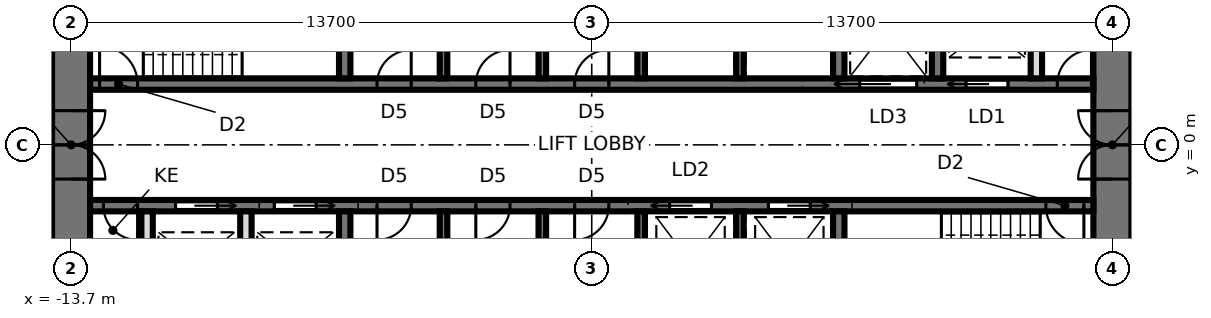
"""IFC4 building model, lengths in metres.
Left out: names, types, materials, properties, quantities, classifications, styles, units other than length and angle.
Written with IfcOpenShell. Run it as: python <this file> out.ifc"""

import sys

from ifc_helpers import new_model, si_unit, direction, frame, frame_2d, origin, place, context, subcontext, project, spatial, rectangle, extrude, element, fill, save


model = new_model("IFC4")
c1 = context("Model", 3, precision=1e-05, world=origin(), true_north=direction((0.0, 1.0)))
c2 = subcontext(c1, "Body", "Model", "MODEL_VIEW")
j1 = project(units=[si_unit("LENGTHUNIT", "METRE"), si_unit("PLANEANGLEUNIT", "RADIAN")], contexts=[c1])
p1 = place(None, origin())
s1 = spatial("IfcSite", under=j1, at=p1, CompositionType="ELEMENT")
p2 = place(p1, origin())
s2 = spatial("IfcBuilding", under=s1, at=p2, CompositionType="ELEMENT")
p3 = place(p2, frame((0.0, 0.0, 176.0)))
s3 = spatial("IfcBuildingStorey", under=s2, at=p3, CompositionType="ELEMENT", Elevation=176.0)
p4 = place(p3, frame((13.7, -9.5, 0.0), z_axis=(0.0, 0.0, 1.0), x_axis=(0.0, 1.0, 0.0)))
e1 = element("IfcWall", 1, at=p4, inside=s3, PredefinedType="SHEAR", context=c2, shape_type="SweptSolid", body=[
    extrude(rectangle(XDim=19.0, YDim=1.0, at=frame_2d((9.5, 0.0))), origin(), (0.0, 0.0, 1.0), 3.9),
])
p5 = place(p4, frame((8.6, 0.0, 0.0)))
e2 = element("IfcOpeningElement", 2, at=p5, cuts=e1, PredefinedType="OPENING", context=c2, shape_type="SweptSolid", body=[
    extrude(rectangle(XDim=1.8, YDim=2.4, at=frame_2d((0.9, 1.2))), frame((0.0, 0.51, 0.0), z_axis=(0.0, -1.0, 0.0), x_axis=(1.0, 0.0, 0.0)), (0.0, 0.0, 1.0), 1.02),
])
p6 = place(p3, frame((-13.7, 9.5, 0.0), z_axis=(0.0, 0.0, 1.0), x_axis=(0.0, -1.0, 0.0)))
e3 = element("IfcWall", 3, at=p6, inside=s3, PredefinedType="SHEAR", context=c2, shape_type="SweptSolid", body=[
    extrude(rectangle(XDim=19.0, YDim=1.0, at=frame_2d((9.5, 0.0))), origin(), (0.0, 0.0, 1.0), 3.9),
])
p7 = place(p6, frame((8.6, 0.0, 0.0)))
e4 = element("IfcOpeningElement", 4, at=p7, cuts=e3, PredefinedType="OPENING", context=c2, shape_type="SweptSolid", body=[
    extrude(rectangle(XDim=1.8, YDim=2.4, at=frame_2d((0.9, 1.2))), frame((0.0, 0.51, 0.0), z_axis=(0.0, -1.0, 0.0), x_axis=(1.0, 0.0, 0.0)), (0.0, 0.0, 1.0), 1.02),
])
p8 = place(p3, frame((-13.2, 1.6, 0.0), z_axis=(0.0, 0.0, 1.0), x_axis=(1.0, 0.0, 0.0)))
e5 = element("IfcWall", 5, at=p8, inside=s3, PredefinedType="SHEAR", context=c2, shape_type="SweptSolid", body=[
    extrude(rectangle(XDim=26.4, YDim=0.3, at=frame_2d((13.2, 0.0))), origin(), (0.0, 0.0, 1.0), 3.9),
])
p9 = place(p8, frame((0.25, 0.0, 0.0)))
e6 = element("IfcOpeningElement", 6, at=p9, cuts=e5, PredefinedType="OPENING", context=c2, shape_type="SweptSolid", body=[
    extrude(rectangle(XDim=1.0, YDim=2.1, at=frame_2d((0.5, 1.05))), frame((0.0, 0.16, 0.0), z_axis=(0.0, -1.0, 0.0), x_axis=(1.0, 0.0, 0.0)), (0.0, 0.0, 1.0), 0.32),
])
p10 = place(p8, frame((23.05, 0.0, 0.0)))
e7 = element("IfcOpeningElement", 7, at=p10, cuts=e5, PredefinedType="OPENING", context=c2, shape_type="SweptSolid", body=[
    extrude(rectangle(XDim=1.1, YDim=2.3, at=frame_2d((0.55, 1.15))), frame((0.0, 0.16, 0.0), z_axis=(0.0, -1.0, 0.0), x_axis=(1.0, 0.0, 0.0)), (0.0, 0.0, 1.0), 0.32),
])
p11 = place(p8, frame((20.25, 0.0, 0.0)))
e8 = element("IfcOpeningElement", 8, at=p11, cuts=e5, PredefinedType="OPENING", context=c2, shape_type="SweptSolid", body=[
    extrude(rectangle(XDim=1.5, YDim=2.4, at=frame_2d((0.75, 1.2))), frame((0.0, 0.16, 0.0), z_axis=(0.0, -1.0, 0.0), x_axis=(1.0, 0.0, 0.0)), (0.0, 0.0, 1.0), 0.32),
])
p12 = place(p8, frame((7.55, 0.0, 0.0)))
e9 = element("IfcOpeningElement", 9, at=p12, cuts=e5, PredefinedType="OPENING", context=c2, shape_type="SweptSolid", body=[
    extrude(rectangle(XDim=0.9, YDim=2.1, at=frame_2d((0.45, 1.05))), frame((0.0, 0.16, 0.0), z_axis=(0.0, -1.0, 0.0), x_axis=(1.0, 0.0, 0.0)), (0.0, 0.0, 1.0), 0.32),
])
p13 = place(p8, frame((10.15, 0.0, 0.0)))
e10 = element("IfcOpeningElement", 10, at=p13, cuts=e5, PredefinedType="OPENING", context=c2, shape_type="SweptSolid", body=[
    extrude(rectangle(XDim=0.9, YDim=2.1, at=frame_2d((0.45, 1.05))), frame((0.0, 0.16, 0.0), z_axis=(0.0, -1.0, 0.0), x_axis=(1.0, 0.0, 0.0)), (0.0, 0.0, 1.0), 0.32),
])
p14 = place(p8, frame((12.75, 0.0, 0.0)))
e11 = element("IfcOpeningElement", 11, at=p14, cuts=e5, PredefinedType="OPENING", context=c2, shape_type="SweptSolid", body=[
    extrude(rectangle(XDim=0.9, YDim=2.1, at=frame_2d((0.45, 1.05))), frame((0.0, 0.16, 0.0), z_axis=(0.0, -1.0, 0.0), x_axis=(1.0, 0.0, 0.0)), (0.0, 0.0, 1.0), 0.32),
])
p15 = place(p8, frame((25.45, 0.0, 0.0)))
e12 = element("IfcOpeningElement", 12, at=p15, cuts=e5, PredefinedType="OPENING", context=c2, shape_type="SweptSolid", body=[
    extrude(rectangle(XDim=0.9, YDim=2.1, at=frame_2d((0.45, 1.05))), frame((0.0, 0.16, 0.0), z_axis=(0.0, -1.0, 0.0), x_axis=(1.0, 0.0, 0.0)), (0.0, 0.0, 1.0), 0.32),
])
p16 = place(p3, frame((-13.2, -1.6, 0.0), z_axis=(0.0, 0.0, 1.0), x_axis=(1.0, 0.0, 0.0)))
e13 = element("IfcWall", 13, at=p16, inside=s3, PredefinedType="SHEAR", context=c2, shape_type="SweptSolid", body=[
    extrude(rectangle(XDim=26.4, YDim=0.3, at=frame_2d((13.2, 0.0))), origin(), (0.0, 0.0, 1.0), 3.9),
])
p17 = place(p16, frame((25.15, 0.0, 0.0)))
e14 = element("IfcOpeningElement", 14, at=p17, cuts=e13, PredefinedType="OPENING", context=c2, shape_type="SweptSolid", body=[
    extrude(rectangle(XDim=1.0, YDim=2.1, at=frame_2d((0.5, 1.05))), frame((0.0, 0.16, 0.0), z_axis=(0.0, -1.0, 0.0), x_axis=(1.0, 0.0, 0.0)), (0.0, 0.0, 1.0), 0.32),
])
p18 = place(p16, frame((7.55, 0.0, 0.0)))
e15 = element("IfcOpeningElement", 15, at=p18, cuts=e13, PredefinedType="OPENING", context=c2, shape_type="SweptSolid", body=[
    extrude(rectangle(XDim=0.9, YDim=2.1, at=frame_2d((0.45, 1.05))), frame((0.0, 0.16, 0.0), z_axis=(0.0, -1.0, 0.0), x_axis=(1.0, 0.0, 0.0)), (0.0, 0.0, 1.0), 0.32),
])
p19 = place(p16, frame((10.15, 0.0, 0.0)))
e16 = element("IfcOpeningElement", 16, at=p19, cuts=e13, PredefinedType="OPENING", context=c2, shape_type="SweptSolid", body=[
    extrude(rectangle(XDim=0.9, YDim=2.1, at=frame_2d((0.45, 1.05))), frame((0.0, 0.16, 0.0), z_axis=(0.0, -1.0, 0.0), x_axis=(1.0, 0.0, 0.0)), (0.0, 0.0, 1.0), 0.32),
])
p20 = place(p16, frame((12.75, 0.0, 0.0)))
e17 = element("IfcOpeningElement", 17, at=p20, cuts=e13, PredefinedType="OPENING", context=c2, shape_type="SweptSolid", body=[
    extrude(rectangle(XDim=0.9, YDim=2.1, at=frame_2d((0.45, 1.05))), frame((0.0, 0.16, 0.0), z_axis=(0.0, -1.0, 0.0), x_axis=(1.0, 0.0, 0.0)), (0.0, 0.0, 1.0), 0.32),
])
p21 = place(p16, frame((15.25, 0.0, 0.0)))
e18 = element("IfcOpeningElement", 18, at=p21, cuts=e13, PredefinedType="OPENING", context=c2, shape_type="SweptSolid", body=[
    extrude(rectangle(XDim=1.1, YDim=2.3, at=frame_2d((0.55, 1.15))), frame((0.0, 0.16, 0.0), z_axis=(0.0, -1.0, 0.0), x_axis=(1.0, 0.0, 0.0)), (0.0, 0.0, 1.0), 0.32),
])
p22 = place(p16, frame((17.85, 0.0, 0.0)))
e19 = element("IfcOpeningElement", 19, at=p22, cuts=e13, PredefinedType="OPENING", context=c2, shape_type="SweptSolid", body=[
    extrude(rectangle(XDim=1.1, YDim=2.3, at=frame_2d((0.55, 1.15))), frame((0.0, 0.16, 0.0), z_axis=(0.0, -1.0, 0.0), x_axis=(1.0, 0.0, 0.0)), (0.0, 0.0, 1.0), 0.32),
])
p23 = place(p16, frame((4.85, 0.0, 0.0)))
e20 = element("IfcOpeningElement", 20, at=p23, cuts=e13, PredefinedType="OPENING", context=c2, shape_type="SweptSolid", body=[
    extrude(rectangle(XDim=1.1, YDim=2.3, at=frame_2d((0.55, 1.15))), frame((0.0, 0.16, 0.0), z_axis=(0.0, -1.0, 0.0), x_axis=(1.0, 0.0, 0.0)), (0.0, 0.0, 1.0), 0.32),
])
p24 = place(p16, frame((2.25, 0.0, 0.0)))
e21 = element("IfcOpeningElement", 21, at=p24, cuts=e13, PredefinedType="OPENING", context=c2, shape_type="SweptSolid", body=[
    extrude(rectangle(XDim=1.1, YDim=2.3, at=frame_2d((0.55, 1.15))), frame((0.0, 0.16, 0.0), z_axis=(0.0, -1.0, 0.0), x_axis=(1.0, 0.0, 0.0)), (0.0, 0.0, 1.0), 0.32),
])
p25 = place(p16, frame((0.35, 0.0, 0.0)))
e22 = element("IfcOpeningElement", 22, at=p25, cuts=e13, PredefinedType="OPENING", context=c2, shape_type="SweptSolid", body=[
    extrude(rectangle(XDim=0.9, YDim=2.1, at=frame_2d((0.45, 1.05))), frame((0.0, 0.16, 0.0), z_axis=(0.0, -1.0, 0.0), x_axis=(1.0, 0.0, 0.0)), (0.0, 0.0, 1.0), 0.32),
])
for number, where, z_axis, x_axis in (
    (23, (-6.5, 1.75, 0.0), (0.0, 0.0, 1.0), (0.0, 1.0, 0.0)),
    (24, (6.5, 1.75, 0.0), (0.0, 0.0, 1.0), (0.0, 1.0, 0.0)),
):
    element("IfcWall", number, at=place(p3, frame(where, z_axis=z_axis, x_axis=x_axis)), inside=s3, PredefinedType="SHEAR", context=c2, shape_type="SweptSolid", body=[
        extrude(rectangle(XDim=2.7, YDim=0.3, at=frame_2d((1.35, 0.0))), origin(), (0.0, 0.0, 1.0), 3.9),
    ])
for number, where, z_axis, x_axis in (
    (25, (-3.9, 1.75, 0.0), (0.0, 0.0, 1.0), (0.0, 1.0, 0.0)),
    (26, (-1.3, 1.75, 0.0), (0.0, 0.0, 1.0), (0.0, 1.0, 0.0)),
    (27, (1.3, 1.75, 0.0), (0.0, 0.0, 1.0), (0.0, 1.0, 0.0)),
    (28, (3.9, 1.75, 0.0), (0.0, 0.0, 1.0), (0.0, 1.0, 0.0)),
):
    element("IfcWall", number, at=place(p3, frame(where, z_axis=z_axis, x_axis=x_axis)), inside=s3, PredefinedType="SHEAR", context=c2, shape_type="SweptSolid", body=[
        extrude(rectangle(XDim=2.7, YDim=0.2, at=frame_2d((1.35, 0.0))), origin(), (0.0, 0.0, 1.0), 3.9),
    ])
for number, where, z_axis, x_axis in (
    (29, (-6.5, -1.75, 0.0), (0.0, 0.0, 1.0), (0.0, -1.0, 0.0)),
    (30, (6.5, -1.75, 0.0), (0.0, 0.0, 1.0), (0.0, -1.0, 0.0)),
):
    element("IfcWall", number, at=place(p3, frame(where, z_axis=z_axis, x_axis=x_axis)), inside=s3, PredefinedType="SHEAR", context=c2, shape_type="SweptSolid", body=[
        extrude(rectangle(XDim=2.7, YDim=0.3, at=frame_2d((1.35, 0.0))), origin(), (0.0, 0.0, 1.0), 3.9),
    ])
for number, where, z_axis, x_axis in (
    (31, (-3.9, -1.75, 0.0), (0.0, 0.0, 1.0), (0.0, -1.0, 0.0)),
    (32, (-1.3, -1.75, 0.0), (0.0, 0.0, 1.0), (0.0, -1.0, 0.0)),
    (33, (1.3, -1.75, 0.0), (0.0, 0.0, 1.0), (0.0, -1.0, 0.0)),
    (34, (3.9, -1.75, 0.0), (0.0, 0.0, 1.0), (0.0, -1.0, 0.0)),
):
    element("IfcWall", number, at=place(p3, frame(where, z_axis=z_axis, x_axis=x_axis)), inside=s3, PredefinedType="SHEAR", context=c2, shape_type="SweptSolid", body=[
        extrude(rectangle(XDim=2.7, YDim=0.2, at=frame_2d((1.35, 0.0))), origin(), (0.0, 0.0, 1.0), 3.9),
    ])
p26 = place(p3, frame((9.1, 1.75, 0.0), z_axis=(0.0, 0.0, 1.0), x_axis=(0.0, 1.0, 0.0)))
e35 = element("IfcWall", 35, at=p26, inside=s3, PredefinedType="SHEAR", context=c2, shape_type="SweptSolid", body=[
    extrude(rectangle(XDim=2.7, YDim=0.3, at=frame_2d((1.35, 0.0))), origin(), (0.0, 0.0, 1.0), 3.9),
])
for number, where, z_axis, x_axis in (
    (36, (-9.1, -1.75, 0.0), (0.0, 0.0, 1.0), (0.0, -1.0, 0.0)),
    (37, (-11.7, -1.75, 0.0), (0.0, 0.0, 1.0), (0.0, -1.0, 0.0)),
    (38, (11.7, 1.75, 0.0), (0.0, 0.0, 1.0), (0.0, 1.0, 0.0)),
):
    element("IfcWall", number, at=place(p3, frame(where, z_axis=z_axis, x_axis=x_axis)), inside=s3, PredefinedType="SOLIDWALL", context=c2, shape_type="SweptSolid", body=[
        extrude(rectangle(XDim=2.7, YDim=0.3, at=frame_2d((1.35, 0.0))), origin(), (0.0, 0.0, 1.0), 3.74),
    ])
p27 = place(p7, origin())
e39 = element("IfcDoor", 39, at=p27, inside=s3, OperationType="DOUBLE_DOOR_SINGLE_SWING", PredefinedType="DOOR", context=c2, shape_type="SweptSolid", body=[
    extrude(rectangle(XDim=1.72, YDim=2.36, at=frame_2d((0.9, 1.18))), frame((0.0, 0.025, 0.0), z_axis=(0.0, -1.0, 0.0), x_axis=(1.0, 0.0, 0.0)), (0.0, 0.0, 1.0), 0.05),
    extrude(rectangle(XDim=0.04, YDim=2.4, at=frame_2d((0.02, 1.2))), frame((0.0, 0.25, 0.0), z_axis=(0.0, -1.0, 0.0), x_axis=(1.0, 0.0, 0.0)), (0.0, 0.0, 1.0), 0.5),
    extrude(rectangle(XDim=0.04, YDim=2.4, at=frame_2d((1.78, 1.2))), frame((0.0, 0.25, 0.0), z_axis=(0.0, -1.0, 0.0), x_axis=(1.0, 0.0, 0.0)), (0.0, 0.0, 1.0), 0.5),
    extrude(rectangle(XDim=1.72, YDim=0.04, at=frame_2d((0.9, 2.38))), frame((0.0, 0.25, 0.0), z_axis=(0.0, -1.0, 0.0), x_axis=(1.0, 0.0, 0.0)), (0.0, 0.0, 1.0), 0.5),
])
fill(e4, e39)
p28 = place(p5, origin())
e40 = element("IfcDoor", 40, at=p28, inside=s3, OperationType="DOUBLE_DOOR_SINGLE_SWING", PredefinedType="DOOR", context=c2, shape_type="SweptSolid", body=[
    extrude(rectangle(XDim=1.72, YDim=2.36, at=frame_2d((0.9, 1.18))), frame((0.0, 0.025, 0.0), z_axis=(0.0, -1.0, 0.0), x_axis=(1.0, 0.0, 0.0)), (0.0, 0.0, 1.0), 0.05),
    extrude(rectangle(XDim=0.04, YDim=2.4, at=frame_2d((0.02, 1.2))), frame((0.0, 0.25, 0.0), z_axis=(0.0, -1.0, 0.0), x_axis=(1.0, 0.0, 0.0)), (0.0, 0.0, 1.0), 0.5),
    extrude(rectangle(XDim=0.04, YDim=2.4, at=frame_2d((1.78, 1.2))), frame((0.0, 0.25, 0.0), z_axis=(0.0, -1.0, 0.0), x_axis=(1.0, 0.0, 0.0)), (0.0, 0.0, 1.0), 0.5),
    extrude(rectangle(XDim=1.72, YDim=0.04, at=frame_2d((0.9, 2.38))), frame((0.0, 0.25, 0.0), z_axis=(0.0, -1.0, 0.0), x_axis=(1.0, 0.0, 0.0)), (0.0, 0.0, 1.0), 0.5),
])
fill(e2, e40)
p29 = place(p9, origin())
e41 = element("IfcDoor", 41, at=p29, inside=s3, OperationType="SINGLE_SWING_LEFT", PredefinedType="DOOR", context=c2, shape_type="SweptSolid", body=[
    extrude(rectangle(XDim=1.0, YDim=2.1, at=frame_2d((0.5, 1.05))), frame((0.0, 0.025, 0.0), z_axis=(0.0, -1.0, 0.0), x_axis=(1.0, 0.0, 0.0)), (0.0, 0.0, 1.0), 0.05),
])
fill(e6, e41)
p30 = place(p17, frame((1.0, 0.0, 0.0), z_axis=(0.0, 0.0, 1.0), x_axis=(-1.0, 0.0, 0.0)))
e42 = element("IfcDoor", 42, at=p30, inside=s3, OperationType="SINGLE_SWING_LEFT", PredefinedType="DOOR", context=c2, shape_type="SweptSolid", body=[
    extrude(rectangle(XDim=1.0, YDim=2.1, at=frame_2d((0.5, 1.05))), frame((0.0, 0.025, 0.0), z_axis=(0.0, -1.0, 0.0), x_axis=(1.0, 0.0, 0.0)), (0.0, 0.0, 1.0), 0.05),
])
fill(e14, e42)
p31 = place(p10, origin())
e43 = element("IfcDoor", 43, at=p31, inside=s3, OperationType="SLIDING_TO_LEFT", PredefinedType="DOOR", context=c2, shape_type="SweptSolid", body=[
    extrude(rectangle(XDim=1.1, YDim=2.3, at=frame_2d((0.55, 1.15))), frame((0.0, 0.025, 0.0), z_axis=(0.0, -1.0, 0.0), x_axis=(1.0, 0.0, 0.0)), (0.0, 0.0, 1.0), 0.05),
])
fill(e7, e43)
p32 = place(p11, origin())
e44 = element("IfcDoor", 44, at=p32, inside=s3, OperationType="SLIDING_TO_LEFT", PredefinedType="DOOR", context=c2, shape_type="SweptSolid", body=[
    extrude(rectangle(XDim=1.5, YDim=2.4, at=frame_2d((0.75, 1.2))), frame((0.0, 0.025, 0.0), z_axis=(0.0, -1.0, 0.0), x_axis=(1.0, 0.0, 0.0)), (0.0, 0.0, 1.0), 0.05),
])
fill(e8, e44)
p33 = place(p12, origin())
e45 = element("IfcDoor", 45, at=p33, inside=s3, OperationType="SINGLE_SWING_RIGHT", PredefinedType="DOOR", context=c2, shape_type="SweptSolid", body=[
    extrude(rectangle(XDim=0.9, YDim=2.1, at=frame_2d((0.45, 1.05))), frame((0.0, 0.025, 0.0), z_axis=(0.0, -1.0, 0.0), x_axis=(1.0, 0.0, 0.0)), (0.0, 0.0, 1.0), 0.05),
])
fill(e9, e45)
p34 = place(p13, origin())
e46 = element("IfcDoor", 46, at=p34, inside=s3, OperationType="SINGLE_SWING_RIGHT", PredefinedType="DOOR", context=c2, shape_type="SweptSolid", body=[
    extrude(rectangle(XDim=0.9, YDim=2.1, at=frame_2d((0.45, 1.05))), frame((0.0, 0.025, 0.0), z_axis=(0.0, -1.0, 0.0), x_axis=(1.0, 0.0, 0.0)), (0.0, 0.0, 1.0), 0.05),
])
fill(e10, e46)
p35 = place(p14, origin())
e47 = element("IfcDoor", 47, at=p35, inside=s3, OperationType="SINGLE_SWING_RIGHT", PredefinedType="DOOR", context=c2, shape_type="SweptSolid", body=[
    extrude(rectangle(XDim=0.9, YDim=2.1, at=frame_2d((0.45, 1.05))), frame((0.0, 0.025, 0.0), z_axis=(0.0, -1.0, 0.0), x_axis=(1.0, 0.0, 0.0)), (0.0, 0.0, 1.0), 0.05),
])
fill(e11, e47)
p36 = place(p18, frame((0.9, 0.0, 0.0), z_axis=(0.0, 0.0, 1.0), x_axis=(-1.0, 0.0, 0.0)))
e48 = element("IfcDoor", 48, at=p36, inside=s3, OperationType="SINGLE_SWING_RIGHT", PredefinedType="DOOR", context=c2, shape_type="SweptSolid", body=[
    extrude(rectangle(XDim=0.9, YDim=2.1, at=frame_2d((0.45, 1.05))), frame((0.0, 0.025, 0.0), z_axis=(0.0, -1.0, 0.0), x_axis=(1.0, 0.0, 0.0)), (0.0, 0.0, 1.0), 0.05),
])
fill(e15, e48)
p37 = place(p19, frame((0.9, 0.0, 0.0), z_axis=(0.0, 0.0, 1.0), x_axis=(-1.0, 0.0, 0.0)))
e49 = element("IfcDoor", 49, at=p37, inside=s3, OperationType="SINGLE_SWING_RIGHT", PredefinedType="DOOR", context=c2, shape_type="SweptSolid", body=[
    extrude(rectangle(XDim=0.9, YDim=2.1, at=frame_2d((0.45, 1.05))), frame((0.0, 0.025, 0.0), z_axis=(0.0, -1.0, 0.0), x_axis=(1.0, 0.0, 0.0)), (0.0, 0.0, 1.0), 0.05),
])
fill(e16, e49)
p38 = place(p20, frame((0.9, 0.0, 0.0), z_axis=(0.0, 0.0, 1.0), x_axis=(-1.0, 0.0, 0.0)))
e50 = element("IfcDoor", 50, at=p38, inside=s3, OperationType="SINGLE_SWING_RIGHT", PredefinedType="DOOR", context=c2, shape_type="SweptSolid", body=[
    extrude(rectangle(XDim=0.9, YDim=2.1, at=frame_2d((0.45, 1.05))), frame((0.0, 0.025, 0.0), z_axis=(0.0, -1.0, 0.0), x_axis=(1.0, 0.0, 0.0)), (0.0, 0.0, 1.0), 0.05),
])
fill(e17, e50)
p39 = place(p21, frame((1.1, 0.0, 0.0), z_axis=(0.0, 0.0, 1.0), x_axis=(-1.0, 0.0, 0.0)))
e51 = element("IfcDoor", 51, at=p39, inside=s3, OperationType="SLIDING_TO_RIGHT", PredefinedType="DOOR", context=c2, shape_type="SweptSolid", body=[
    extrude(rectangle(XDim=1.1, YDim=2.3, at=frame_2d((0.55, 1.15))), frame((0.0, 0.025, 0.0), z_axis=(0.0, -1.0, 0.0), x_axis=(1.0, 0.0, 0.0)), (0.0, 0.0, 1.0), 0.05),
])
fill(e18, e51)
p40 = place(p22, frame((1.1, 0.0, 0.0), z_axis=(0.0, 0.0, 1.0), x_axis=(-1.0, 0.0, 0.0)))
e52 = element("IfcDoor", 52, at=p40, inside=s3, OperationType="SLIDING_TO_LEFT", PredefinedType="DOOR", context=c2, shape_type="SweptSolid", body=[
    extrude(rectangle(XDim=1.1, YDim=2.3, at=frame_2d((0.55, 1.15))), frame((0.0, 0.025, 0.0), z_axis=(0.0, -1.0, 0.0), x_axis=(1.0, 0.0, 0.0)), (0.0, 0.0, 1.0), 0.05),
])
fill(e19, e52)
p41 = place(p23, frame((1.1, 0.0, 0.0), z_axis=(0.0, 0.0, 1.0), x_axis=(-1.0, 0.0, 0.0)))
e53 = element("IfcDoor", 53, at=p41, inside=s3, OperationType="SLIDING_TO_LEFT", PredefinedType="DOOR", context=c2, shape_type="SweptSolid", body=[
    extrude(rectangle(XDim=1.1, YDim=2.3, at=frame_2d((0.55, 1.15))), frame((0.0, 0.025, 0.0), z_axis=(0.0, -1.0, 0.0), x_axis=(1.0, 0.0, 0.0)), (0.0, 0.0, 1.0), 0.05),
])
fill(e20, e53)
p42 = place(p24, frame((1.1, 0.0, 0.0), z_axis=(0.0, 0.0, 1.0), x_axis=(-1.0, 0.0, 0.0)))
e54 = element("IfcDoor", 54, at=p42, inside=s3, OperationType="SLIDING_TO_LEFT", PredefinedType="DOOR", context=c2, shape_type="SweptSolid", body=[
    extrude(rectangle(XDim=1.1, YDim=2.3, at=frame_2d((0.55, 1.15))), frame((0.0, 0.025, 0.0), z_axis=(0.0, -1.0, 0.0), x_axis=(1.0, 0.0, 0.0)), (0.0, 0.0, 1.0), 0.05),
])
fill(e21, e54)
p43 = place(p15, origin())
e55 = element("IfcDoor", 55, at=p43, inside=s3, OperationType="SINGLE_SWING_RIGHT", PredefinedType="DOOR", context=c2, shape_type="SweptSolid", body=[
    extrude(rectangle(XDim=0.9, YDim=2.1, at=frame_2d((0.45, 1.05))), frame((0.0, 0.025, 0.0), z_axis=(0.0, -1.0, 0.0), x_axis=(1.0, 0.0, 0.0)), (0.0, 0.0, 1.0), 0.05),
])
fill(e12, e55)
p44 = place(p25, frame((0.9, 0.0, 0.0), z_axis=(0.0, 0.0, 1.0), x_axis=(-1.0, 0.0, 0.0)))
e56 = element("IfcDoor", 56, at=p44, inside=s3, OperationType="SINGLE_SWING_LEFT", PredefinedType="DOOR", context=c2, shape_type="SweptSolid", body=[
    extrude(rectangle(XDim=0.9, YDim=2.1, at=frame_2d((0.45, 1.05))), frame((0.0, 0.025, 0.0), z_axis=(0.0, -1.0, 0.0), x_axis=(1.0, 0.0, 0.0)), (0.0, 0.0, 1.0), 0.05),
])
fill(e22, e56)
save(model, sys.argv[1])
